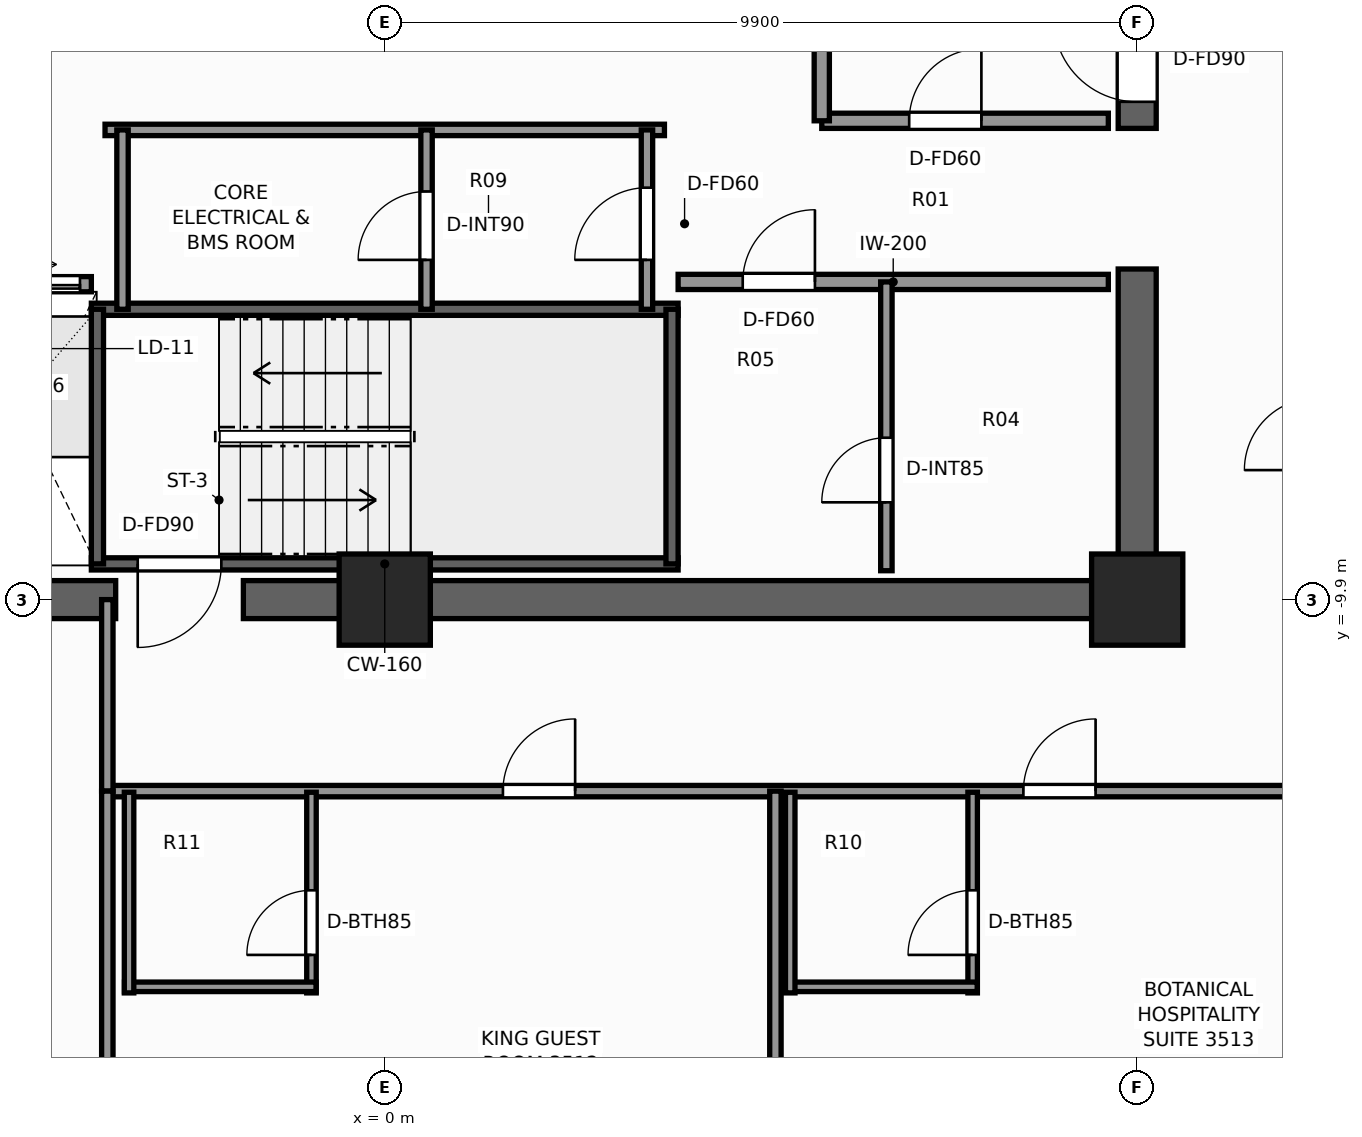
"""IFC4 building model, lengths in metres.
Left out: names, types, materials, properties, quantities, classifications, styles, units other than length and angle.
Written with IfcOpenShell. Run it as: python <this file> out.ifc"""

import sys

from ifc_helpers import new_model, si_unit, direction, frame, frame_2d, origin, origin_2d, place, context, subcontext, project, spatial, rectangle, extrude, element, fill, save


model = new_model("IFC4")
c1 = context("Model", 3, precision=1e-05, world=origin(), true_north=direction((0.0, 1.0)))
c2 = subcontext(c1, "Body", "Model", "MODEL_VIEW")
j1 = project(units=[si_unit("LENGTHUNIT", "METRE"), si_unit("PLANEANGLEUNIT", "RADIAN")], contexts=[c1])
p1 = place(None, origin())
s1 = spatial("IfcSite", under=j1, at=p1, CompositionType="ELEMENT")
p2 = place(p1, origin())
s2 = spatial("IfcBuilding", under=s1, at=p2, CompositionType="ELEMENT")
p3 = place(p2, frame((0.0, 0.0, 121.7)))
s3 = spatial("IfcBuildingStorey", under=s2, at=p3, CompositionType="ELEMENT", Elevation=121.7)
p4 = place(p3, frame((10.15, -9.9, 0.0), z_axis=(0.0, 0.0, 1.0), x_axis=(-1.0, 0.0, 0.0)))
e1 = element("IfcWall", 1, at=p4, inside=s3, PredefinedType="SHEAR", context=c2, shape_type="SweptSolid", body=[
    extrude(rectangle(XDim=12.01, YDim=0.5, at=frame_2d((6.005, 0.0))), origin(), (0.0, 0.0, 1.0), 3.3),
])
p5 = place(p3, frame((-3.54, -9.9, 0.0), z_axis=(0.0, 0.0, 1.0), x_axis=(-1.0, 0.0, 0.0)))
e2 = element("IfcWall", 2, at=p5, inside=s3, PredefinedType="SHEAR", context=c2, shape_type="SweptSolid", body=[
    extrude(rectangle(XDim=6.61, YDim=0.5, at=frame_2d((3.305, 0.0))), origin(), (0.0, 0.0, 1.0), 3.3),
])
p6 = place(p3, frame((9.9, -9.65, 0.0), z_axis=(0.0, 0.0, 1.0), x_axis=(0.0, 1.0, 0.0)))
e3 = element("IfcWall", 3, at=p6, inside=s3, PredefinedType="SHEAR", context=c2, shape_type="SweptSolid", body=[
    extrude(rectangle(XDim=4.1, YDim=0.5, at=frame_2d((2.05, 0.0))), origin(), (0.0, 0.0, 1.0), 3.3),
])
p7 = place(p3, frame((9.9, -3.7, 0.0), z_axis=(0.0, 0.0, 1.0), x_axis=(0.0, 1.0, 0.0)))
e4 = element("IfcWall", 4, at=p7, inside=s3, PredefinedType="SHEAR", context=c2, shape_type="SweptSolid", body=[
    extrude(rectangle(XDim=13.35, YDim=0.5, at=frame_2d((6.675, 0.0))), origin(), (0.0, 0.0, 1.0), 3.3),
])
p8 = place(p7, frame((0.35, 0.0, 0.0)))
e5 = element("IfcOpeningElement", 5, at=p8, cuts=e4, PredefinedType="OPENING", context=c2, shape_type="SweptSolid", body=[
    extrude(rectangle(XDim=1.1, YDim=2.2, at=frame_2d((0.55, 1.1))), frame((0.0, 0.26, 0.0), z_axis=(0.0, -1.0, 0.0), x_axis=(1.0, 0.0, 0.0)), (0.0, 0.0, 1.0), 0.52),
])
for number, where, z_axis, x_axis in (
    (6, (9.9, -9.9, 0.0), (0.0, 0.0, 1.0), (1.0, 0.0, 0.0)),
    (7, (0.0, -9.9, 0.0), (0.0, 0.0, 1.0), (1.0, 0.0, 0.0)),
):
    element("IfcColumn", number, at=place(p3, frame(where, z_axis=z_axis, x_axis=x_axis)), inside=s3, PredefinedType="COLUMN", context=c2, shape_type="SweptSolid", body=[
        extrude(rectangle(XDim=1.2, YDim=1.2, at=origin_2d()), origin(), (0.0, 0.0, 1.0), 3.3),
    ])
p9 = place(p3, frame((3.86, -9.43, 0.0), z_axis=(0.0, 0.0, 1.0), x_axis=(-1.0, 0.0, 0.0)))
e8 = element("IfcWall", 8, at=p9, inside=s3, PredefinedType="SHEAR", context=c2, shape_type="SweptSolid", body=[
    extrude(rectangle(XDim=7.72, YDim=0.16, at=frame_2d((3.86, 0.0))), origin(), (0.0, 0.0, 1.0), 3.3),
])
p10 = place(p9, frame((6.01, 0.0, 0.0)))
e9 = element("IfcOpeningElement", 9, at=p10, cuts=e8, PredefinedType="OPENING", context=c2, shape_type="SweptSolid", body=[
    extrude(rectangle(XDim=1.1, YDim=2.2, at=frame_2d((0.55, 1.1))), frame((0.0, 0.09, 0.0), z_axis=(0.0, -1.0, 0.0), x_axis=(1.0, 0.0, 0.0)), (0.0, 0.0, 1.0), 0.18),
])
p11 = place(p3, frame((-3.86, -6.08, 0.0), z_axis=(0.0, 0.0, 1.0), x_axis=(1.0, 0.0, 0.0)))
e10 = element("IfcWall", 10, at=p11, inside=s3, PredefinedType="SHEAR", context=c2, shape_type="SweptSolid", body=[
    extrude(rectangle(XDim=7.72, YDim=0.16, at=frame_2d((3.86, 0.0))), origin(), (0.0, 0.0, 1.0), 3.3),
])
for number, where, z_axis, x_axis in (
    (11, (-3.78, -9.43, 0.0), (0.0, 0.0, 1.0), (0.0, 1.0, 0.0)),
    (12, (3.78, -9.43, 0.0), (0.0, 0.0, 1.0), (0.0, 1.0, 0.0)),
):
    element("IfcWall", number, at=place(p3, frame(where, z_axis=z_axis, x_axis=x_axis)), inside=s3, PredefinedType="SHEAR", context=c2, shape_type="SweptSolid", body=[
        extrude(rectangle(XDim=3.35, YDim=0.16, at=frame_2d((1.675, 0.0))), origin(), (0.0, 0.0, 1.0), 3.3),
    ])
p12 = place(p3, frame((5.75, -3.6, 0.0), z_axis=(0.0, 0.0, 1.0), x_axis=(1.0, 0.0, 0.0)))
e13 = element("IfcWall", 13, at=p12, inside=s3, PredefinedType="SOLIDWALL", context=c2, shape_type="SweptSolid", body=[
    extrude(rectangle(XDim=3.77, YDim=0.2, at=frame_2d((1.885, 0.0))), origin(), (0.0, 0.0, 1.0), 3.08),
])
p13 = place(p12, frame((1.15, 0.0, 0.0)))
e14 = element("IfcOpeningElement", 14, at=p13, cuts=e13, PredefinedType="OPENING", context=c2, shape_type="SweptSolid", body=[
    extrude(rectangle(XDim=0.95, YDim=2.06, at=frame_2d((0.475, 1.03))), frame((0.0, 0.11, 0.0), z_axis=(0.0, -1.0, 0.0), x_axis=(1.0, 0.0, 0.0)), (0.0, 0.0, 1.0), 0.22),
])
p14 = place(p3, frame((5.75, -3.6, 0.0), z_axis=(0.0, 0.0, 1.0), x_axis=(0.0, 1.0, 0.0)))
e15 = element("IfcWall", 15, at=p14, inside=s3, PredefinedType="SOLIDWALL", context=c2, shape_type="SweptSolid", body=[
    extrude(rectangle(XDim=5.57, YDim=0.2, at=frame_2d((2.785, 0.0))), origin(), (0.0, 0.0, 1.0), 2.715),
])
p15 = place(p14, frame((2.75, 0.0, 0.0)))
e16 = element("IfcOpeningElement", 16, at=p15, cuts=e15, PredefinedType="OPENING", context=c2, shape_type="SweptSolid", body=[
    extrude(rectangle(XDim=1.1, YDim=2.2, at=frame_2d((0.55, 1.1))), frame((0.0, 0.11, 0.0), z_axis=(0.0, -1.0, 0.0), x_axis=(1.0, 0.0, 0.0)), (0.0, 0.0, 1.0), 0.22),
])
p16 = place(p3, frame((-9.52, -5.75, 0.0), z_axis=(0.0, 0.0, 1.0), x_axis=(1.0, 0.0, 0.0)))
e17 = element("IfcWall", 17, at=p16, inside=s3, PredefinedType="SOLIDWALL", context=c2, shape_type="SweptSolid", body=[
    extrude(rectangle(XDim=5.66, YDim=0.2, at=frame_2d((2.83, 0.0))), origin(), (0.0, 0.0, 1.0), 3.08),
])
p17 = place(p16, frame((0.55, 0.0, 0.0)))
e18 = element("IfcOpeningElement", 18, at=p17, cuts=e17, PredefinedType="OPENING", context=c2, shape_type="SweptSolid", body=[
    extrude(rectangle(XDim=1.1, YDim=2.2, at=frame_2d((0.55, 1.1))), frame((0.0, 0.11, 0.0), z_axis=(0.0, -1.0, 0.0), x_axis=(1.0, 0.0, 0.0)), (0.0, 0.0, 1.0), 0.22),
])
p18 = place(p16, frame((2.48, 0.0, 0.0)))
e19 = element("IfcOpeningElement", 19, at=p18, cuts=e17, PredefinedType="OPENING", context=c2, shape_type="SweptSolid", body=[
    extrude(rectangle(XDim=1.1, YDim=2.2, at=frame_2d((0.55, 1.1))), frame((0.0, 0.11, 0.0), z_axis=(0.0, -1.0, 0.0), x_axis=(1.0, 0.0, 0.0)), (0.0, 0.0, 1.0), 0.22),
])
p19 = place(p16, frame((4.41, 0.0, 0.0)))
e20 = element("IfcOpeningElement", 20, at=p19, cuts=e17, PredefinedType="OPENING", context=c2, shape_type="SweptSolid", body=[
    extrude(rectangle(XDim=1.1, YDim=2.2, at=frame_2d((0.55, 1.1))), frame((0.0, 0.11, 0.0), z_axis=(0.0, -1.0, 0.0), x_axis=(1.0, 0.0, 0.0)), (0.0, 0.0, 1.0), 0.22),
])
p20 = place(p3, frame((3.86, -5.72, 0.0), z_axis=(0.0, 0.0, 1.0), x_axis=(1.0, 0.0, 0.0)))
e21 = element("IfcWall", 21, at=p20, inside=s3, PredefinedType="SOLIDWALL", context=c2, shape_type="SweptSolid", body=[
    extrude(rectangle(XDim=5.66, YDim=0.2, at=frame_2d((2.83, 0.0))), origin(), (0.0, 0.0, 1.0), 3.08),
])
p21 = place(p20, frame((0.85, 0.0, 0.0)))
e22 = element("IfcOpeningElement", 22, at=p21, cuts=e21, PredefinedType="OPENING", context=c2, shape_type="SweptSolid", body=[
    extrude(rectangle(XDim=0.95, YDim=2.06, at=frame_2d((0.475, 1.03))), frame((0.0, 0.11, 0.0), z_axis=(0.0, -1.0, 0.0), x_axis=(1.0, 0.0, 0.0)), (0.0, 0.0, 1.0), 0.22),
])
p22 = place(p3, frame((6.6, -9.52, 0.0), z_axis=(0.0, 0.0, 1.0), x_axis=(0.0, 1.0, 0.0)))
e23 = element("IfcWall", 23, at=p22, inside=s3, PredefinedType="PARTITIONING", context=c2, shape_type="SweptSolid", body=[
    extrude(rectangle(XDim=3.8, YDim=0.15, at=frame_2d((1.9, 0.0))), origin(), (0.0, 0.0, 1.0), 3.08),
])
p23 = place(p22, frame((0.9, 0.0, 0.0)))
e24 = element("IfcOpeningElement", 24, at=p23, cuts=e23, PredefinedType="OPENING", context=c2, shape_type="SweptSolid", body=[
    extrude(rectangle(XDim=0.85, YDim=2.03, at=frame_2d((0.425, 1.015))), frame((0.0, 0.085, 0.0), z_axis=(0.0, -1.0, 0.0), x_axis=(1.0, 0.0, 0.0)), (0.0, 0.0, 1.0), 0.17),
])
p24 = place(p3, frame((-3.68, -3.72, 0.0), z_axis=(0.0, 0.0, 1.0), x_axis=(1.0, 0.0, 0.0)))
e25 = element("IfcWall", 25, at=p24, inside=s3, PredefinedType="PARTITIONING", context=c2, shape_type="SweptSolid", body=[
    extrude(rectangle(XDim=7.36, YDim=0.15, at=frame_2d((3.68, 0.0))), origin(), (0.0, 0.0, 1.0), 3.08),
])
p25 = place(p3, frame((3.45, -6.08, 0.0), z_axis=(0.0, 0.0, 1.0), x_axis=(0.0, 1.0, 0.0)))
e26 = element("IfcWall", 26, at=p25, inside=s3, PredefinedType="PARTITIONING", context=c2, shape_type="SweptSolid", body=[
    extrude(rectangle(XDim=2.36, YDim=0.15, at=frame_2d((1.18, 0.0))), origin(), (0.0, 0.0, 1.0), 3.08),
])
p26 = place(p25, frame((0.65, 0.0, 0.0)))
e27 = element("IfcOpeningElement", 27, at=p26, cuts=e26, PredefinedType="OPENING", context=c2, shape_type="SweptSolid", body=[
    extrude(rectangle(XDim=0.95, YDim=2.06, at=frame_2d((0.475, 1.03))), frame((0.0, 0.085, 0.0), z_axis=(0.0, -1.0, 0.0), x_axis=(1.0, 0.0, 0.0)), (0.0, 0.0, 1.0), 0.17),
])
p27 = place(p3, frame((-3.45, -6.08, 0.0), z_axis=(0.0, 0.0, 1.0), x_axis=(0.0, 1.0, 0.0)))
e28 = element("IfcWall", 28, at=p27, inside=s3, PredefinedType="PARTITIONING", context=c2, shape_type="SweptSolid", body=[
    extrude(rectangle(XDim=2.36, YDim=0.15, at=frame_2d((1.18, 0.0))), origin(), (0.0, 0.0, 1.0), 3.08),
])
p28 = place(p3, frame((0.55, -6.08, 0.0), z_axis=(0.0, 0.0, 1.0), x_axis=(0.0, 1.0, 0.0)))
e29 = element("IfcWall", 29, at=p28, inside=s3, PredefinedType="PARTITIONING", context=c2, shape_type="SweptSolid", body=[
    extrude(rectangle(XDim=2.36, YDim=0.15, at=frame_2d((1.18, 0.0))), origin(), (0.0, 0.0, 1.0), 3.08),
])
p29 = place(p28, frame((0.65, 0.0, 0.0)))
e30 = element("IfcOpeningElement", 30, at=p29, cuts=e29, PredefinedType="OPENING", context=c2, shape_type="SweptSolid", body=[
    extrude(rectangle(XDim=0.9, YDim=2.06, at=frame_2d((0.45, 1.03))), frame((0.0, 0.085, 0.0), z_axis=(0.0, -1.0, 0.0), x_axis=(1.0, 0.0, 0.0)), (0.0, 0.0, 1.0), 0.17),
])
p30 = place(p3, frame((-3.65, -12.42, 0.0), z_axis=(0.0, 0.0, 1.0), x_axis=(1.0, 0.0, 0.0)))
e31 = element("IfcWall", 31, at=p30, inside=s3, PredefinedType="PARTITIONING", context=c2, shape_type="SweptSolid", body=[
    extrude(rectangle(XDim=15.91, YDim=0.15, at=frame_2d((7.955, 0.0))), origin(), (0.0, 0.0, 1.0), 2.292),
])
p31 = place(p30, frame((5.205, 0.0, 0.0)))
e32 = element("IfcOpeningElement", 32, at=p31, cuts=e31, PredefinedType="OPENING", context=c2, shape_type="SweptSolid", body=[
    extrude(rectangle(XDim=0.95, YDim=2.06, at=frame_2d((0.475, 1.03))), frame((0.0, 0.085, 0.0), z_axis=(0.0, -1.0, 0.0), x_axis=(1.0, 0.0, 0.0)), (0.0, 0.0, 1.0), 0.17),
])
p32 = place(p30, frame((12.052, 0.0, 0.0)))
e33 = element("IfcOpeningElement", 33, at=p32, cuts=e31, PredefinedType="OPENING", context=c2, shape_type="SweptSolid", body=[
    extrude(rectangle(XDim=0.95, YDim=2.06, at=frame_2d((0.475, 1.03))), frame((0.0, 0.085, 0.0), z_axis=(0.0, -1.0, 0.0), x_axis=(1.0, 0.0, 0.0)), (0.0, 0.0, 1.0), 0.17),
])
p33 = place(p3, frame((-3.65, -12.42, 0.0), z_axis=(0.0, 0.0, 1.0), x_axis=(0.0, 1.0, 0.0)))
e34 = element("IfcWall", 34, at=p33, inside=s3, PredefinedType="PARTITIONING", context=c2, shape_type="SweptSolid", body=[
    extrude(rectangle(XDim=2.52, YDim=0.15, at=frame_2d((1.26, 0.0))), origin(), (0.0, 0.0, 1.0), 3.08),
])
for number, where, z_axis, x_axis in (
    (35, (-3.65, -19.08, 0.0), (0.0, 0.0, 1.0), (0.0, 1.0, 0.0)),
    (36, (5.14, -19.08, 0.0), (0.0, 0.0, 1.0), (0.0, 1.0, 0.0)),
):
    element("IfcWall", number, at=place(p3, frame(where, z_axis=z_axis, x_axis=x_axis)), inside=s3, PredefinedType="PARTITIONING", context=c2, shape_type="SweptSolid", body=[
        extrude(rectangle(XDim=6.66, YDim=0.15, at=frame_2d((3.33, 0.0))), origin(), (0.0, 0.0, 1.0), 2.449),
    ])
p34 = place(p3, frame((-0.964, -15.075, 0.0), z_axis=(0.0, 0.0, 1.0), x_axis=(0.0, 1.0, 0.0)))
e37 = element("IfcWall", 37, at=p34, inside=s3, PredefinedType="PARTITIONING", context=c2, shape_type="SweptSolid", body=[
    extrude(rectangle(XDim=2.64, YDim=0.125, at=frame_2d((1.32, 0.0))), origin(), (0.0, 0.0, 1.0), 3.08),
])
p35 = place(p34, frame((0.5, 0.0, 0.0)))
e38 = element("IfcOpeningElement", 38, at=p35, cuts=e37, PredefinedType="OPENING", context=c2, shape_type="SweptSolid", body=[
    extrude(rectangle(XDim=0.85, YDim=2.03, at=frame_2d((0.425, 1.015))), frame((0.0, 0.073, 0.0), z_axis=(0.0, -1.0, 0.0), x_axis=(1.0, 0.0, 0.0)), (0.0, 0.0, 1.0), 0.145),
])
p36 = place(p3, frame((-3.424, -14.995, 0.0), z_axis=(0.0, 0.0, 1.0), x_axis=(1.0, 0.0, 0.0)))
e39 = element("IfcWall", 39, at=p36, inside=s3, PredefinedType="PARTITIONING", context=c2, shape_type="SweptSolid", body=[
    extrude(rectangle(XDim=2.52, YDim=0.125, at=frame_2d((1.26, 0.0))), origin(), (0.0, 0.0, 1.0), 3.08),
])
p37 = place(p3, frame((-3.364, -15.075, 0.0), z_axis=(0.0, 0.0, 1.0), x_axis=(0.0, 1.0, 0.0)))
e40 = element("IfcWall", 40, at=p37, inside=s3, PredefinedType="PARTITIONING", context=c2, shape_type="SweptSolid", body=[
    extrude(rectangle(XDim=2.64, YDim=0.125, at=frame_2d((1.32, 0.0))), origin(), (0.0, 0.0, 1.0), 3.08),
])
p38 = place(p3, frame((7.735, -15.075, 0.0), z_axis=(0.0, 0.0, 1.0), x_axis=(0.0, 1.0, 0.0)))
e41 = element("IfcWall", 41, at=p38, inside=s3, PredefinedType="PARTITIONING", context=c2, shape_type="SweptSolid", body=[
    extrude(rectangle(XDim=2.64, YDim=0.125, at=frame_2d((1.32, 0.0))), origin(), (0.0, 0.0, 1.0), 3.08),
])
p39 = place(p38, frame((0.5, 0.0, 0.0)))
e42 = element("IfcOpeningElement", 42, at=p39, cuts=e41, PredefinedType="OPENING", context=c2, shape_type="SweptSolid", body=[
    extrude(rectangle(XDim=0.85, YDim=2.03, at=frame_2d((0.425, 1.015))), frame((0.0, 0.073, 0.0), z_axis=(0.0, -1.0, 0.0), x_axis=(1.0, 0.0, 0.0)), (0.0, 0.0, 1.0), 0.145),
])
p40 = place(p3, frame((5.275, -14.995, 0.0), z_axis=(0.0, 0.0, 1.0), x_axis=(1.0, 0.0, 0.0)))
e43 = element("IfcWall", 43, at=p40, inside=s3, PredefinedType="PARTITIONING", context=c2, shape_type="SweptSolid", body=[
    extrude(rectangle(XDim=2.52, YDim=0.125, at=frame_2d((1.26, 0.0))), origin(), (0.0, 0.0, 1.0), 3.08),
])
p41 = place(p3, frame((5.335, -15.075, 0.0), z_axis=(0.0, 0.0, 1.0), x_axis=(0.0, 1.0, 0.0)))
e44 = element("IfcWall", 44, at=p41, inside=s3, PredefinedType="PARTITIONING", context=c2, shape_type="SweptSolid", body=[
    extrude(rectangle(XDim=2.64, YDim=0.125, at=frame_2d((1.32, 0.0))), origin(), (0.0, 0.0, 1.0), 3.08),
])
p42 = place(p10, origin())
e45 = element("IfcDoor", 45, at=p42, inside=s3, OperationType="SINGLE_SWING_RIGHT", PredefinedType="DOOR", context=c2, shape_type="SweptSolid", body=[
    extrude(rectangle(XDim=1.1, YDim=2.2, at=frame_2d((0.55, 1.1))), frame((0.0, 0.025, 0.0), z_axis=(0.0, -1.0, 0.0), x_axis=(1.0, 0.0, 0.0)), (0.0, 0.0, 1.0), 0.05),
])
fill(e9, e45)
p43 = place(p8, origin())
e46 = element("IfcDoor", 46, at=p43, inside=s3, OperationType="SINGLE_SWING_RIGHT", PredefinedType="DOOR", context=c2, shape_type="SweptSolid", body=[
    extrude(rectangle(XDim=1.1, YDim=2.2, at=frame_2d((0.55, 1.1))), frame((0.0, 0.025, 0.0), z_axis=(0.0, -1.0, 0.0), x_axis=(1.0, 0.0, 0.0)), (0.0, 0.0, 1.0), 0.05),
])
fill(e5, e46)
p44 = place(p19, origin())
e47 = element("IfcDoor", 47, at=p44, inside=s3, OperationType="DOUBLE_DOOR_SLIDING", PredefinedType="DOOR", context=c2, shape_type="SweptSolid", body=[
    extrude(rectangle(XDim=1.1, YDim=2.2, at=frame_2d((0.55, 1.1))), frame((0.0, 0.025, 0.0), z_axis=(0.0, -1.0, 0.0), x_axis=(1.0, 0.0, 0.0)), (0.0, 0.0, 1.0), 0.05),
])
fill(e20, e47)
p45 = place(p21, origin())
e48 = element("IfcDoor", 48, at=p45, inside=s3, OperationType="SINGLE_SWING_RIGHT", PredefinedType="DOOR", context=c2, shape_type="SweptSolid", body=[
    extrude(rectangle(XDim=0.95, YDim=2.06, at=frame_2d((0.475, 1.03))), frame((0.0, 0.025, 0.0), z_axis=(0.0, -1.0, 0.0), x_axis=(1.0, 0.0, 0.0)), (0.0, 0.0, 1.0), 0.05),
])
fill(e22, e48)
p46 = place(p23, origin())
e49 = element("IfcDoor", 49, at=p46, inside=s3, OperationType="SINGLE_SWING_LEFT", PredefinedType="DOOR", context=c2, shape_type="SweptSolid", body=[
    extrude(rectangle(XDim=0.85, YDim=2.03, at=frame_2d((0.425, 1.015))), frame((0.0, 0.025, 0.0), z_axis=(0.0, -1.0, 0.0), x_axis=(1.0, 0.0, 0.0)), (0.0, 0.0, 1.0), 0.05),
])
fill(e24, e49)
p47 = place(p13, origin())
e50 = element("IfcDoor", 50, at=p47, inside=s3, OperationType="SINGLE_SWING_RIGHT", PredefinedType="DOOR", context=c2, shape_type="SweptSolid", body=[
    extrude(rectangle(XDim=0.95, YDim=2.06, at=frame_2d((0.475, 1.03))), frame((0.0, 0.025, 0.0), z_axis=(0.0, -1.0, 0.0), x_axis=(1.0, 0.0, 0.0)), (0.0, 0.0, 1.0), 0.05),
])
fill(e14, e50)
p48 = place(p26, origin())
e51 = element("IfcDoor", 51, at=p48, inside=s3, OperationType="SINGLE_SWING_LEFT", PredefinedType="DOOR", context=c2, shape_type="SweptSolid", body=[
    extrude(rectangle(XDim=0.95, YDim=2.06, at=frame_2d((0.475, 1.03))), frame((0.0, 0.025, 0.0), z_axis=(0.0, -1.0, 0.0), x_axis=(1.0, 0.0, 0.0)), (0.0, 0.0, 1.0), 0.05),
])
fill(e27, e51)
p49 = place(p29, origin())
e52 = element("IfcDoor", 52, at=p49, inside=s3, OperationType="SINGLE_SWING_LEFT", PredefinedType="DOOR", context=c2, shape_type="SweptSolid", body=[
    extrude(rectangle(XDim=0.9, YDim=2.06, at=frame_2d((0.45, 1.03))), frame((0.0, 0.025, 0.0), z_axis=(0.0, -1.0, 0.0), x_axis=(1.0, 0.0, 0.0)), (0.0, 0.0, 1.0), 0.05),
])
fill(e30, e52)
p50 = place(p35, origin())
e53 = element("IfcDoor", 53, at=p50, inside=s3, OperationType="SINGLE_SWING_LEFT", PredefinedType="DOOR", context=c2, shape_type="SweptSolid", body=[
    extrude(rectangle(XDim=0.85, YDim=2.03, at=frame_2d((0.425, 1.015))), frame((0.0, 0.025, 0.0), z_axis=(0.0, -1.0, 0.0), x_axis=(1.0, 0.0, 0.0)), (0.0, 0.0, 1.0), 0.05),
])
fill(e38, e53)
p51 = place(p31, origin())
e54 = element("IfcDoor", 54, at=p51, inside=s3, OperationType="SINGLE_SWING_RIGHT", PredefinedType="DOOR", context=c2, shape_type="SweptSolid", body=[
    extrude(rectangle(XDim=0.95, YDim=2.06, at=frame_2d((0.475, 1.03))), frame((0.0, 0.025, 0.0), z_axis=(0.0, -1.0, 0.0), x_axis=(1.0, 0.0, 0.0)), (0.0, 0.0, 1.0), 0.05),
])
fill(e32, e54)
p52 = place(p39, origin())
e55 = element("IfcDoor", 55, at=p52, inside=s3, OperationType="SINGLE_SWING_LEFT", PredefinedType="DOOR", context=c2, shape_type="SweptSolid", body=[
    extrude(rectangle(XDim=0.85, YDim=2.03, at=frame_2d((0.425, 1.015))), frame((0.0, 0.025, 0.0), z_axis=(0.0, -1.0, 0.0), x_axis=(1.0, 0.0, 0.0)), (0.0, 0.0, 1.0), 0.05),
])
fill(e42, e55)
p53 = place(p32, origin())
e56 = element("IfcDoor", 56, at=p53, inside=s3, OperationType="SINGLE_SWING_RIGHT", PredefinedType="DOOR", context=c2, shape_type="SweptSolid", body=[
    extrude(rectangle(XDim=0.95, YDim=2.06, at=frame_2d((0.475, 1.03))), frame((0.0, 0.025, 0.0), z_axis=(0.0, -1.0, 0.0), x_axis=(1.0, 0.0, 0.0)), (0.0, 0.0, 1.0), 0.05),
])
fill(e33, e56)
save(model, sys.argv[1])
